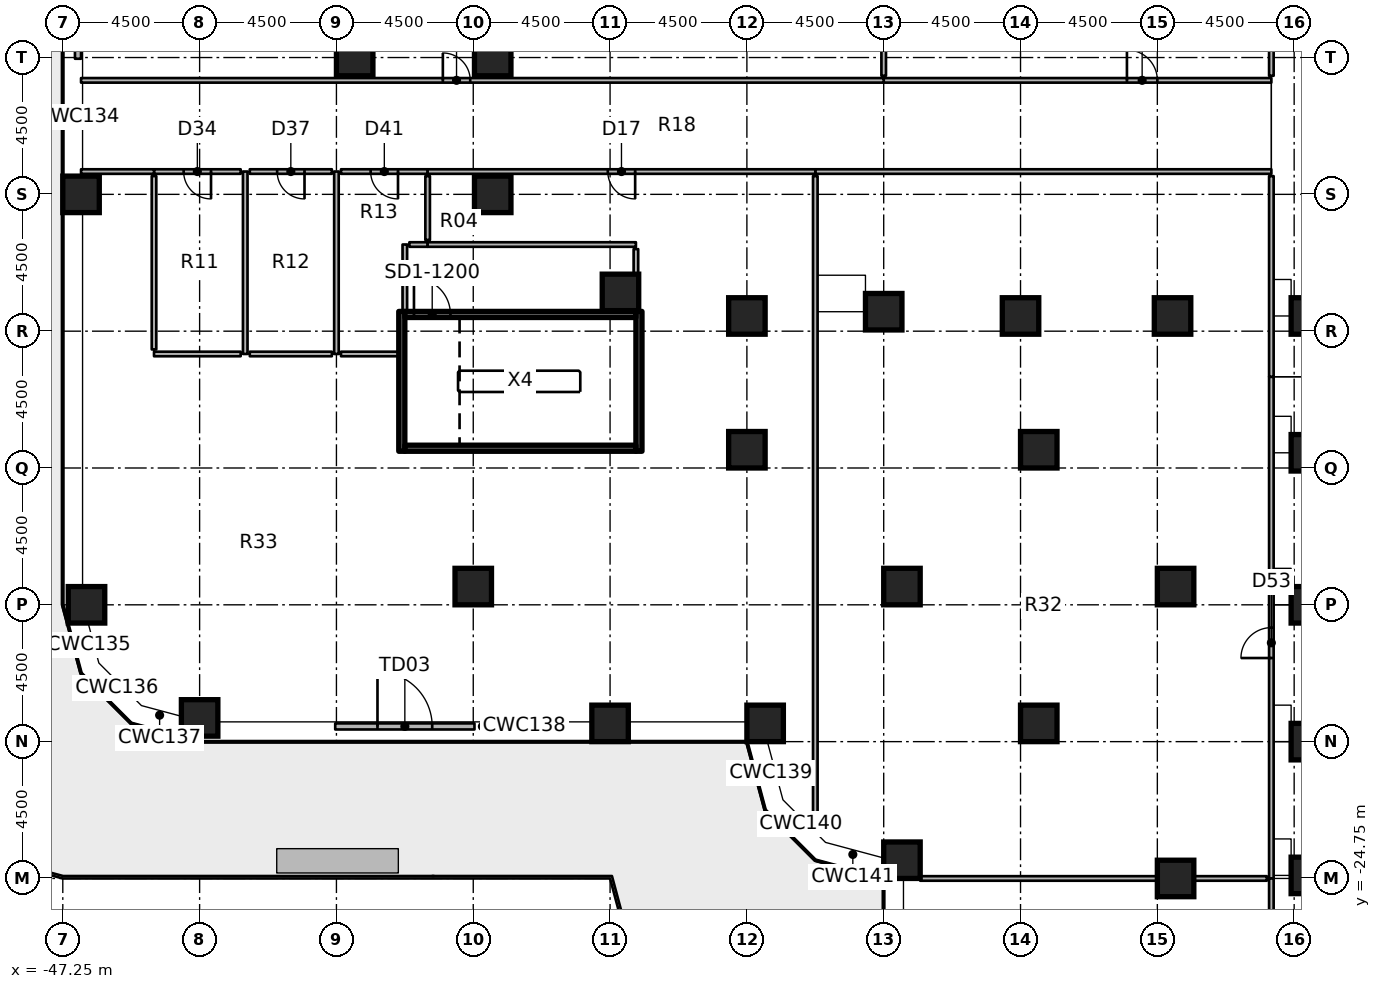
"""IFC4 building model, lengths in metres.
Left out: names, types, materials, properties, quantities, classifications, styles, units other than length and angle.
Written with IfcOpenShell. Run it as: python <this file> out.ifc"""

import sys

from ifc_helpers import new_model, si_unit, direction, frame, frame_2d, origin, origin_2d, place, context, subcontext, project, spatial, rectangle, extrude, element, fill, save


model = new_model("IFC4")
c1 = context("Model", 3, precision=1e-05, world=origin(), true_north=direction((0.0, 1.0)))
c2 = subcontext(c1, "Body", "Model", "MODEL_VIEW")
j1 = project(units=[si_unit("LENGTHUNIT", "METRE"), si_unit("PLANEANGLEUNIT", "RADIAN")], contexts=[c1])
p1 = place(None, origin())
s1 = spatial("IfcSite", under=j1, at=p1, CompositionType="ELEMENT")
p2 = place(p1, origin())
s2 = spatial("IfcBuilding", under=s1, at=p2, CompositionType="ELEMENT")
p3 = place(p2, frame((0.0, 0.0, 12.0)))
s3 = spatial("IfcBuildingStorey", under=s2, at=p3, CompositionType="ELEMENT", Elevation=12.0)
for number, where, z_axis, x_axis in (
    (1, (-46.47, -15.75, 0.0), (0.0, 0.0, 1.0), (1.0, 0.0, 0.0)),
    (2, (-46.65, -2.25, 0.0), (0.0, 0.0, 1.0), (1.0, 0.0, 0.0)),
    (3, (-42.75, -19.47, 0.0), (0.0, 0.0, 1.0), (1.0, 0.0, 0.0)),
    (4, (-37.65, 2.25, 0.0), (0.0, 0.0, 1.0), (1.0, 0.0, 0.0)),
    (5, (-33.75, -15.15, 0.0), (0.0, 0.0, 1.0), (1.0, 0.0, 0.0)),
    (6, (-33.11, -2.25, 0.0), (0.0, 0.0, 1.0), (1.0, 0.0, 0.0)),
    (7, (-33.11, 2.25, 0.0), (0.0, 0.0, 1.0), (1.0, 0.0, 0.0)),
    (8, (-29.25, -19.65, 0.0), (0.0, 0.0, 1.0), (1.0, 0.0, 0.0)),
    (9, (-28.908, -5.475, 0.0), (0.0, 0.0, 1.0), (1.0, 0.0, 0.0)),
    (10, (-24.15, -19.65, 0.0), (0.0, 0.0, 1.0), (1.0, 0.0, 0.0)),
    (11, (-24.75, -10.65, 0.0), (0.0, 0.0, 1.0), (1.0, 0.0, 0.0)),
    (12, (-24.75, -6.25, 0.0), (0.0, 0.0, 1.0), (1.0, 0.0, 0.0)),
    (13, (-19.65, -24.15, 0.0), (0.0, 0.0, 1.0), (1.0, 0.0, 0.0)),
    (14, (-19.65, -15.15, 0.0), (0.0, 0.0, 1.0), (1.0, 0.0, 0.0)),
    (15, (-20.25, -6.11, 0.0), (0.0, 0.0, 1.0), (1.0, 0.0, 0.0)),
    (16, (-15.15, -19.65, 0.0), (0.0, 0.0, 1.0), (1.0, 0.0, 0.0)),
    (17, (-15.15, -10.65, 0.0), (0.0, 0.0, 1.0), (1.0, 0.0, 0.0)),
    (18, (-15.75, -6.25, 0.0), (0.0, 0.0, 1.0), (1.0, 0.0, 0.0)),
    (19, (-10.65, -24.75, 0.0), (0.0, 0.0, 1.0), (1.0, 0.0, 0.0)),
    (20, (-10.65, -15.15, 0.0), (0.0, 0.0, 1.0), (1.0, 0.0, 0.0)),
    (21, (-10.75, -6.25, 0.0), (0.0, 0.0, 1.0), (1.0, 0.0, 0.0)),
    (22, (-6.25, -24.65, 0.0), (0.0, 0.0, 1.0), (1.0, 0.0, 0.0)),
    (23, (-6.25, -20.25, 0.0), (0.0, 0.0, 1.0), (1.0, 0.0, 0.0)),
    (24, (-6.25, -15.75, 0.0), (0.0, 0.0, 1.0), (1.0, 0.0, 0.0)),
    (25, (-6.25, -10.75, 0.0), (0.0, 0.0, 1.0), (1.0, 0.0, 0.0)),
    (26, (-6.25, -6.25, 0.0), (0.0, 0.0, 1.0), (1.0, 0.0, 0.0)),
):
    element("IfcColumn", number, at=place(p3, frame(where, z_axis=z_axis, x_axis=x_axis)), inside=s3, PredefinedType="COLUMN", context=c2, shape_type="SweptSolid", body=[
        extrude(rectangle(XDim=1.2, YDim=1.2, at=origin_2d()), origin(), (0.0, 0.0, 1.0), 4.55),
    ])
p4 = place(p3, frame((-46.75, 6.79, 0.0), z_axis=(0.0, 0.0, 1.0), x_axis=(0.0, -1.0, 0.0)))
e27 = element("IfcWall", 27, at=p4, inside=s3, PredefinedType="SOLIDWALL", context=c2, shape_type="SweptSolid", body=[
    extrude(rectangle(XDim=4.58, YDim=0.2, at=frame_2d((2.29, 0.0))), origin(), (0.0, 0.0, 1.0), 4.55),
])
p5 = place(p4, frame((1.39, 0.0, 0.0)))
e28 = element("IfcOpeningElement", 28, at=p5, cuts=e27, PredefinedType="OPENING", context=c2, shape_type="SweptSolid", body=[
    extrude(rectangle(XDim=1.8, YDim=2.4, at=frame_2d((0.9, 1.2))), frame((0.0, 0.11, 0.0), z_axis=(0.0, -1.0, 0.0), x_axis=(1.0, 0.0, 0.0)), (0.0, 0.0, 1.0), 0.22),
])
p6 = place(p3, frame((-38.29, -19.75, 0.0), z_axis=(0.0, 0.0, 1.0), x_axis=(1.0, 0.0, 0.0)))
e29 = element("IfcWall", 29, at=p6, inside=s3, PredefinedType="SOLIDWALL", context=c2, shape_type="SweptSolid", body=[
    extrude(rectangle(XDim=4.58, YDim=0.2, at=frame_2d((2.29, 0.0))), origin(), (0.0, 0.0, 1.0), 4.55),
])
p7 = place(p6, frame((1.39, 0.0, 0.0)))
e30 = element("IfcOpeningElement", 30, at=p7, cuts=e29, PredefinedType="OPENING", context=c2, shape_type="SweptSolid", body=[
    extrude(rectangle(XDim=1.8, YDim=2.4, at=frame_2d((0.9, 1.2))), frame((0.0, 0.11, 0.0), z_axis=(0.0, -1.0, 0.0), x_axis=(1.0, 0.0, 0.0)), (0.0, 0.0, 1.0), 0.22),
])
for number, where, z_axis, x_axis in (
    (31, (-36.1, -10.7, 0.0), (0.0, 0.0, 1.0), (0.0, 1.0, 0.0)),
    (32, (-28.3, -10.7, 0.0), (0.0, 0.0, 1.0), (0.0, 1.0, 0.0)),
):
    element("IfcWall", number, at=place(p3, frame(where, z_axis=z_axis, x_axis=x_axis)), inside=s3, PredefinedType="SHEAR", context=c2, shape_type="SweptSolid", body=[
        extrude(rectangle(XDim=4.6, YDim=0.2, at=frame_2d((2.3, 0.0))), origin(), (0.0, 0.0, 1.0), 4.55),
    ])
p8 = place(p3, frame((-36.0, -10.6, 0.0), z_axis=(0.0, 0.0, 1.0), x_axis=(1.0, 0.0, 0.0)))
e33 = element("IfcWall", 33, at=p8, inside=s3, PredefinedType="SHEAR", context=c2, shape_type="SweptSolid", body=[
    extrude(rectangle(XDim=7.6, YDim=0.2, at=frame_2d((3.8, 0.0))), origin(), (0.0, 0.0, 1.0), 4.55),
])
p9 = place(p3, frame((-36.0, -6.2, 0.0), z_axis=(0.0, 0.0, 1.0), x_axis=(1.0, 0.0, 0.0)))
e34 = element("IfcWall", 34, at=p9, inside=s3, PredefinedType="SHEAR", context=c2, shape_type="SweptSolid", body=[
    extrude(rectangle(XDim=7.6, YDim=0.2, at=frame_2d((3.8, 0.0))), origin(), (0.0, 0.0, 1.0), 4.55),
])
p10 = place(p9, frame((0.3, 0.0, 0.0)))
e35 = element("IfcOpeningElement", 35, at=p10, cuts=e34, PredefinedType="OPENING", context=c2, shape_type="SweptSolid", body=[
    extrude(rectangle(XDim=1.2, YDim=2.1, at=frame_2d((0.6, 1.05))), frame((0.0, 0.11, 0.0), z_axis=(0.0, -1.0, 0.0), x_axis=(1.0, 0.0, 0.0)), (0.0, 0.0, 1.0), 0.22),
])
p11 = place(p3, frame((-36.0, -6.1, 0.0), z_axis=(0.0, 0.0, 1.0), x_axis=(0.0, 1.0, 0.0)))
e36 = element("IfcWall", 36, at=p11, inside=s3, PredefinedType="PARTITIONING", context=c2, shape_type="SweptSolid", body=[
    extrude(rectangle(XDim=2.2, YDim=0.15, at=frame_2d((1.1, 0.0))), origin(), (0.0, 0.0, 1.0), 4.55),
])
p12 = place(p3, frame((-35.85, -3.9, 0.0), z_axis=(0.0, 0.0, 1.0), x_axis=(1.0, 0.0, 0.0)))
e37 = element("IfcWall", 37, at=p12, inside=s3, PredefinedType="PARTITIONING", context=c2, shape_type="SweptSolid", body=[
    extrude(rectangle(XDim=0.6, YDim=0.15, at=frame_2d((0.3, 0.0))), origin(), (0.0, 0.0, 1.0), 4.55),
])
p13 = place(p3, frame((-35.25, -3.9, 0.0), z_axis=(0.0, 0.0, 1.0), x_axis=(1.0, 0.0, 0.0)))
e38 = element("IfcWall", 38, at=p13, inside=s3, PredefinedType="PARTITIONING", context=c2, shape_type="SweptSolid", body=[
    extrude(rectangle(XDim=6.85, YDim=0.15, at=frame_2d((3.425, 0.0))), origin(), (0.0, 0.0, 1.0), 4.55),
])
p14 = place(p3, frame((-28.4, -4.05, 0.0), z_axis=(0.0, 0.0, 1.0), x_axis=(0.0, -1.0, 0.0)))
e39 = element("IfcWall", 39, at=p14, inside=s3, PredefinedType="PARTITIONING", context=c2, shape_type="SweptSolid", body=[
    extrude(rectangle(XDim=0.825, YDim=0.15, at=frame_2d((0.413, 0.0))), origin(), (0.0, 0.0, 1.0), 4.55),
])
p15 = place(p3, frame((-41.25, -1.5, 0.0), z_axis=(0.0, 0.0, 1.0), x_axis=(0.0, -1.0, 0.0)))
e40 = element("IfcWall", 40, at=p15, inside=s3, PredefinedType="PARTITIONING", context=c2, shape_type="SweptSolid", body=[
    extrude(rectangle(XDim=6.0, YDim=0.15, at=frame_2d((3.0, 0.0))), origin(), (0.0, 0.0, 1.0), 4.55),
])
p16 = place(p3, frame((-41.4, -1.5, 0.0), z_axis=(0.0, 0.0, 1.0), x_axis=(-1.0, 0.0, 0.0)))
e41 = element("IfcWall", 41, at=p16, inside=s3, PredefinedType="PARTITIONING", context=c2, shape_type="SweptSolid", body=[
    extrude(rectangle(XDim=2.85, YDim=0.15, at=frame_2d((1.425, 0.0))), origin(), (0.0, 0.0, 1.0), 4.55),
])
p17 = place(p16, frame((0.975, 0.0, 0.0)))
e42 = element("IfcOpeningElement", 42, at=p17, cuts=e41, PredefinedType="OPENING", context=c2, shape_type="SweptSolid", body=[
    extrude(rectangle(XDim=0.9, YDim=2.1, at=frame_2d((0.45, 1.05))), frame((0.0, 0.085, 0.0), z_axis=(0.0, -1.0, 0.0), x_axis=(1.0, 0.0, 0.0)), (0.0, 0.0, 1.0), 0.17),
])
p18 = place(p3, frame((-41.4, -7.5, 0.0), z_axis=(0.0, 0.0, 1.0), x_axis=(-1.0, 0.0, 0.0)))
e43 = element("IfcWall", 43, at=p18, inside=s3, PredefinedType="PARTITIONING", context=c2, shape_type="SweptSolid", body=[
    extrude(rectangle(XDim=2.85, YDim=0.15, at=frame_2d((1.425, 0.0))), origin(), (0.0, 0.0, 1.0), 4.55),
])
p19 = place(p3, frame((-44.25, -7.35, 0.0), z_axis=(0.0, 0.0, 1.0), x_axis=(0.0, 1.0, 0.0)))
e44 = element("IfcWall", 44, at=p19, inside=s3, PredefinedType="PARTITIONING", context=c2, shape_type="SweptSolid", body=[
    extrude(rectangle(XDim=5.7, YDim=0.15, at=frame_2d((2.85, 0.0))), origin(), (0.0, 0.0, 1.0), 4.55),
])
p20 = place(p3, frame((-38.25, -1.5, 0.0), z_axis=(0.0, 0.0, 1.0), x_axis=(0.0, -1.0, 0.0)))
e45 = element("IfcWall", 45, at=p20, inside=s3, PredefinedType="PARTITIONING", context=c2, shape_type="SweptSolid", body=[
    extrude(rectangle(XDim=6.0, YDim=0.15, at=frame_2d((3.0, 0.0))), origin(), (0.0, 0.0, 1.0), 4.55),
])
p21 = place(p3, frame((-38.4, -1.5, 0.0), z_axis=(0.0, 0.0, 1.0), x_axis=(-1.0, 0.0, 0.0)))
e46 = element("IfcWall", 46, at=p21, inside=s3, PredefinedType="PARTITIONING", context=c2, shape_type="SweptSolid", body=[
    extrude(rectangle(XDim=2.7, YDim=0.15, at=frame_2d((1.35, 0.0))), origin(), (0.0, 0.0, 1.0), 4.55),
])
p22 = place(p21, frame((0.9, 0.0, 0.0)))
e47 = element("IfcOpeningElement", 47, at=p22, cuts=e46, PredefinedType="OPENING", context=c2, shape_type="SweptSolid", body=[
    extrude(rectangle(XDim=0.9, YDim=2.1, at=frame_2d((0.45, 1.05))), frame((0.0, 0.085, 0.0), z_axis=(0.0, -1.0, 0.0), x_axis=(1.0, 0.0, 0.0)), (0.0, 0.0, 1.0), 0.17),
])
p23 = place(p3, frame((-38.4, -7.5, 0.0), z_axis=(0.0, 0.0, 1.0), x_axis=(-1.0, 0.0, 0.0)))
e48 = element("IfcWall", 48, at=p23, inside=s3, PredefinedType="PARTITIONING", context=c2, shape_type="SweptSolid", body=[
    extrude(rectangle(XDim=2.7, YDim=0.15, at=frame_2d((1.35, 0.0))), origin(), (0.0, 0.0, 1.0), 4.55),
])
p24 = place(p3, frame((-35.25, -1.5, 0.0), z_axis=(0.0, 0.0, 1.0), x_axis=(-1.0, 0.0, 0.0)))
e49 = element("IfcWall", 49, at=p24, inside=s3, PredefinedType="PARTITIONING", context=c2, shape_type="SweptSolid", body=[
    extrude(rectangle(XDim=2.85, YDim=0.15, at=frame_2d((1.425, 0.0))), origin(), (0.0, 0.0, 1.0), 4.55),
])
p25 = place(p24, frame((0.975, 0.0, 0.0)))
e50 = element("IfcOpeningElement", 50, at=p25, cuts=e49, PredefinedType="OPENING", context=c2, shape_type="SweptSolid", body=[
    extrude(rectangle(XDim=0.9, YDim=2.1, at=frame_2d((0.45, 1.05))), frame((0.0, 0.085, 0.0), z_axis=(0.0, -1.0, 0.0), x_axis=(1.0, 0.0, 0.0)), (0.0, 0.0, 1.0), 0.17),
])
p26 = place(p3, frame((-36.2, -7.5, 0.0), z_axis=(0.0, 0.0, 1.0), x_axis=(-1.0, 0.0, 0.0)))
e51 = element("IfcWall", 51, at=p26, inside=s3, PredefinedType="PARTITIONING", context=c2, shape_type="SweptSolid", body=[
    extrude(rectangle(XDim=1.9, YDim=0.15, at=frame_2d((0.95, 0.0))), origin(), (0.0, 0.0, 1.0), 4.55),
])
p27 = place(p3, frame((-35.25, -1.65, 0.0), z_axis=(0.0, 0.0, 1.0), x_axis=(0.0, -1.0, 0.0)))
e52 = element("IfcWall", 52, at=p27, inside=s3, PredefinedType="PARTITIONING", context=c2, shape_type="SweptSolid", body=[
    extrude(rectangle(XDim=2.1, YDim=0.15, at=frame_2d((1.05, 0.0))), origin(), (0.0, 0.0, 1.0), 4.55),
])
p28 = place(p3, frame((-7.5, -24.75, 0.0), z_axis=(0.0, 0.0, 1.0), x_axis=(0.0, 1.0, 0.0)))
e53 = element("IfcWall", 53, at=p28, inside=s3, PredefinedType="PARTITIONING", context=c2, shape_type="SweptSolid", body=[
    extrude(rectangle(XDim=16.5, YDim=0.15, at=frame_2d((8.25, 0.0))), origin(), (0.0, 0.0, 1.0), 4.55),
])
p29 = place(p28, frame((7.25, 0.0, 0.0)))
e54 = element("IfcOpeningElement", 54, at=p29, cuts=e53, PredefinedType="OPENING", context=c2, shape_type="SweptSolid", body=[
    extrude(rectangle(XDim=1.0, YDim=2.1, at=frame_2d((0.5, 1.05))), frame((0.0, 0.085, 0.0), z_axis=(0.0, -1.0, 0.0), x_axis=(1.0, 0.0, 0.0)), (0.0, 0.0, 1.0), 0.17),
])
p30 = place(p3, frame((-7.5, -32.25, 0.0), z_axis=(0.0, 0.0, 1.0), x_axis=(0.0, 1.0, 0.0)))
e55 = element("IfcWall", 55, at=p30, inside=s3, PredefinedType="PARTITIONING", context=c2, shape_type="SweptSolid", body=[
    extrude(rectangle(XDim=7.5, YDim=0.15, at=frame_2d((3.75, 0.0))), origin(), (0.0, 0.0, 1.0), 4.55),
])
p31 = place(p3, frame((-20.25, 1.5, 0.0), z_axis=(0.0, 0.0, 1.0), x_axis=(1.0, 0.0, 0.0)))
e56 = element("IfcWall", 56, at=p31, inside=s3, PredefinedType="PARTITIONING", context=c2, shape_type="SweptSolid", body=[
    extrude(rectangle(XDim=12.75, YDim=0.15, at=frame_2d((6.375, 0.0))), origin(), (0.0, 0.0, 1.0), 4.55),
])
p32 = place(p31, frame((8.0, 0.0, 0.0)))
e57 = element("IfcOpeningElement", 57, at=p32, cuts=e56, PredefinedType="OPENING", context=c2, shape_type="SweptSolid", body=[
    extrude(rectangle(XDim=1.0, YDim=2.1, at=frame_2d((0.5, 1.05))), frame((0.0, 0.085, 0.0), z_axis=(0.0, -1.0, 0.0), x_axis=(1.0, 0.0, 0.0)), (0.0, 0.0, 1.0), 0.17),
])
p33 = place(p3, frame((-46.65, 1.5, 0.0), z_axis=(0.0, 0.0, 1.0), x_axis=(1.0, 0.0, 0.0)))
e58 = element("IfcWall", 58, at=p33, inside=s3, PredefinedType="PARTITIONING", context=c2, shape_type="SweptSolid", body=[
    extrude(rectangle(XDim=26.4, YDim=0.15, at=frame_2d((13.2, 0.0))), origin(), (0.0, 0.0, 1.0), 4.55),
])
p34 = place(p33, frame((11.9, 0.0, 0.0)))
e59 = element("IfcOpeningElement", 59, at=p34, cuts=e58, PredefinedType="OPENING", context=c2, shape_type="SweptSolid", body=[
    extrude(rectangle(XDim=0.9, YDim=2.1, at=frame_2d((0.45, 1.05))), frame((0.0, 0.085, 0.0), z_axis=(0.0, -1.0, 0.0), x_axis=(1.0, 0.0, 0.0)), (0.0, 0.0, 1.0), 0.17),
])
p35 = place(p3, frame((-7.5, -1.5, 0.0), z_axis=(0.0, 0.0, 1.0), x_axis=(-1.0, 0.0, 0.0)))
e60 = element("IfcWall", 60, at=p35, inside=s3, PredefinedType="PARTITIONING", context=c2, shape_type="SweptSolid", body=[
    extrude(rectangle(XDim=15.0, YDim=0.15, at=frame_2d((7.5, 0.0))), origin(), (0.0, 0.0, 1.0), 4.55),
])
p36 = place(p3, frame((-44.25, -1.5, 0.0), z_axis=(0.0, 0.0, 1.0), x_axis=(-1.0, 0.0, 0.0)))
e61 = element("IfcWall", 61, at=p36, inside=s3, PredefinedType="PARTITIONING", context=c2, shape_type="SweptSolid", body=[
    extrude(rectangle(XDim=2.4, YDim=0.15, at=frame_2d((1.2, 0.0))), origin(), (0.0, 0.0, 1.0), 4.55),
])
p37 = place(p3, frame((-22.5, -1.5, 0.0), z_axis=(0.0, 0.0, 1.0), x_axis=(-1.0, 0.0, 0.0)))
e62 = element("IfcWall", 62, at=p37, inside=s3, PredefinedType="PARTITIONING", context=c2, shape_type="SweptSolid", body=[
    extrude(rectangle(XDim=12.75, YDim=0.15, at=frame_2d((6.375, 0.0))), origin(), (0.0, 0.0, 1.0), 4.55),
])
p38 = place(p37, frame((5.925, 0.0, 0.0)))
e63 = element("IfcOpeningElement", 63, at=p38, cuts=e62, PredefinedType="OPENING", context=c2, shape_type="SweptSolid", body=[
    extrude(rectangle(XDim=0.9, YDim=2.1, at=frame_2d((0.45, 1.05))), frame((0.0, 0.085, 0.0), z_axis=(0.0, -1.0, 0.0), x_axis=(1.0, 0.0, 0.0)), (0.0, 0.0, 1.0), 0.17),
])
p39 = place(p3, frame((-20.25, 1.65, 0.0), z_axis=(0.0, 0.0, 1.0), x_axis=(0.0, 1.0, 0.0)))
e64 = element("IfcWall", 64, at=p39, inside=s3, PredefinedType="PARTITIONING", context=c2, shape_type="SweptSolid", body=[
    extrude(rectangle(XDim=3.86, YDim=0.15, at=frame_2d((1.93, 0.0))), origin(), (0.0, 0.0, 1.0), 4.55),
])
p40 = place(p3, frame((-7.5, 8.25, 0.0), z_axis=(0.0, 0.0, 1.0), x_axis=(0.0, -1.0, 0.0)))
e65 = element("IfcWall", 65, at=p40, inside=s3, PredefinedType="PARTITIONING", context=c2, shape_type="SweptSolid", body=[
    extrude(rectangle(XDim=6.6, YDim=0.15, at=frame_2d((3.3, 0.0))), origin(), (0.0, 0.0, 1.0), 4.55),
])
p41 = place(p3, frame((-22.5, -23.297, 0.0), z_axis=(0.0, 0.0, 1.0), x_axis=(0.0, 1.0, 0.0)))
e66 = element("IfcWall", 66, at=p41, inside=s3, PredefinedType="PARTITIONING", context=c2, shape_type="SweptSolid", body=[
    extrude(rectangle(XDim=21.647, YDim=0.15, at=frame_2d((10.824, 0.0))), origin(), (0.0, 0.0, 1.0), 4.55),
])
p42 = place(p3, frame((-7.65, -24.75, 0.0), z_axis=(0.0, 0.0, 1.0), x_axis=(-1.0, 0.0, 0.0)))
e67 = element("IfcWall", 67, at=p42, inside=s3, PredefinedType="PARTITIONING", context=c2, shape_type="SweptSolid", body=[
    extrude(rectangle(XDim=2.4, YDim=0.15, at=frame_2d((1.2, 0.0))), origin(), (0.0, 0.0, 1.0), 4.55),
])
p43 = place(p3, frame((-11.25, -24.75, 0.0), z_axis=(0.0, 0.0, 1.0), x_axis=(-1.0, 0.0, 0.0)))
e68 = element("IfcWall", 68, at=p43, inside=s3, PredefinedType="PARTITIONING", context=c2, shape_type="SweptSolid", body=[
    extrude(rectangle(XDim=7.8, YDim=0.15, at=frame_2d((3.9, 0.0))), origin(), (0.0, 0.0, 1.0), 4.55),
])
p44 = place(p3, frame((-7.5, -1.65, 0.0), z_axis=(0.0, 0.0, 1.0), x_axis=(0.0, -1.0, 0.0)))
e69 = element("IfcWall", 69, at=p44, inside=s3, PredefinedType="PARTITIONING", context=c2, shape_type="SweptSolid", body=[
    extrude(rectangle(XDim=6.6, YDim=0.15, at=frame_2d((3.3, 0.0))), origin(), (0.0, 0.0, 1.0), 4.55),
])
p45 = place(p7, origin())
e70 = element("IfcDoor", 70, at=p45, inside=s3, OperationType="SINGLE_SWING_LEFT", PredefinedType="DOOR", context=c2, shape_type="SweptSolid", body=[
    extrude(rectangle(XDim=1.8, YDim=2.4, at=frame_2d((0.9, 1.2))), frame((0.0, 0.025, 0.0), z_axis=(0.0, -1.0, 0.0), x_axis=(1.0, 0.0, 0.0)), (0.0, 0.0, 1.0), 0.05),
])
fill(e30, e70)
p46 = place(p10, origin())
e71 = element("IfcDoor", 71, at=p46, inside=s3, OperationType="SINGLE_SWING_RIGHT", PredefinedType="DOOR", context=c2, shape_type="SweptSolid", body=[
    extrude(rectangle(XDim=1.2, YDim=2.1, at=frame_2d((0.6, 1.05))), frame((0.0, 0.025, 0.0), z_axis=(0.0, -1.0, 0.0), x_axis=(1.0, 0.0, 0.0)), (0.0, 0.0, 1.0), 0.05),
])
fill(e35, e71)
p47 = place(p17, origin())
e72 = element("IfcDoor", 72, at=p47, inside=s3, OperationType="SINGLE_SWING_LEFT", PredefinedType="DOOR", context=c2, shape_type="SweptSolid", body=[
    extrude(rectangle(XDim=0.9, YDim=2.1, at=frame_2d((0.45, 1.05))), frame((0.0, 0.025, 0.0), z_axis=(0.0, -1.0, 0.0), x_axis=(1.0, 0.0, 0.0)), (0.0, 0.0, 1.0), 0.05),
])
fill(e42, e72)
p48 = place(p22, origin())
e73 = element("IfcDoor", 73, at=p48, inside=s3, OperationType="SINGLE_SWING_LEFT", PredefinedType="DOOR", context=c2, shape_type="SweptSolid", body=[
    extrude(rectangle(XDim=0.9, YDim=2.1, at=frame_2d((0.45, 1.05))), frame((0.0, 0.025, 0.0), z_axis=(0.0, -1.0, 0.0), x_axis=(1.0, 0.0, 0.0)), (0.0, 0.0, 1.0), 0.05),
])
fill(e47, e73)
p49 = place(p25, origin())
e74 = element("IfcDoor", 74, at=p49, inside=s3, OperationType="SINGLE_SWING_LEFT", PredefinedType="DOOR", context=c2, shape_type="SweptSolid", body=[
    extrude(rectangle(XDim=0.9, YDim=2.1, at=frame_2d((0.45, 1.05))), frame((0.0, 0.025, 0.0), z_axis=(0.0, -1.0, 0.0), x_axis=(1.0, 0.0, 0.0)), (0.0, 0.0, 1.0), 0.05),
])
fill(e50, e74)
p50 = place(p29, origin())
e75 = element("IfcDoor", 75, at=p50, inside=s3, OperationType="SINGLE_SWING_LEFT", PredefinedType="DOOR", context=c2, shape_type="SweptSolid", body=[
    extrude(rectangle(XDim=1.0, YDim=2.1, at=frame_2d((0.5, 1.05))), frame((0.0, 0.025, 0.0), z_axis=(0.0, -1.0, 0.0), x_axis=(1.0, 0.0, 0.0)), (0.0, 0.0, 1.0), 0.05),
])
fill(e54, e75)
p51 = place(p32, origin())
e76 = element("IfcDoor", 76, at=p51, inside=s3, OperationType="SINGLE_SWING_LEFT", PredefinedType="DOOR", context=c2, shape_type="SweptSolid", body=[
    extrude(rectangle(XDim=1.0, YDim=2.1, at=frame_2d((0.5, 1.05))), frame((0.0, 0.025, 0.0), z_axis=(0.0, -1.0, 0.0), x_axis=(1.0, 0.0, 0.0)), (0.0, 0.0, 1.0), 0.05),
])
fill(e57, e76)
p52 = place(p34, origin())
e77 = element("IfcDoor", 77, at=p52, inside=s3, OperationType="SINGLE_SWING_LEFT", PredefinedType="DOOR", context=c2, shape_type="SweptSolid", body=[
    extrude(rectangle(XDim=0.9, YDim=2.1, at=frame_2d((0.45, 1.05))), frame((0.0, 0.025, 0.0), z_axis=(0.0, -1.0, 0.0), x_axis=(1.0, 0.0, 0.0)), (0.0, 0.0, 1.0), 0.05),
])
fill(e59, e77)
p53 = place(p38, origin())
e78 = element("IfcDoor", 78, at=p53, inside=s3, OperationType="SINGLE_SWING_LEFT", PredefinedType="DOOR", context=c2, shape_type="SweptSolid", body=[
    extrude(rectangle(XDim=0.9, YDim=2.1, at=frame_2d((0.45, 1.05))), frame((0.0, 0.025, 0.0), z_axis=(0.0, -1.0, 0.0), x_axis=(1.0, 0.0, 0.0)), (0.0, 0.0, 1.0), 0.05),
])
fill(e63, e78)
save(model, sys.argv[1])
